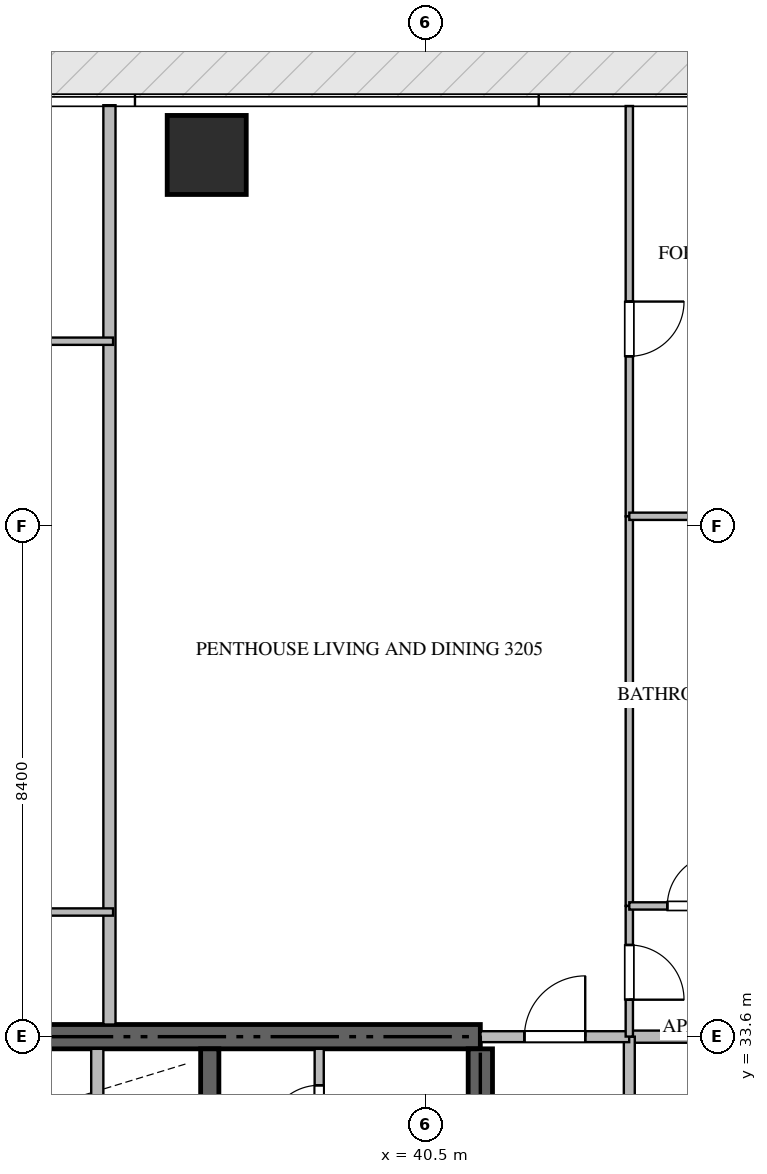
"""IFC4 building model, lengths in metres.
Left out: names, types, materials, properties, quantities, classifications, styles, units other than length and angle.
Written with IfcOpenShell. Run it as: python <this file> out.ifc"""

import sys

from ifc_helpers import new_model, si_unit, direction, frame, frame_2d, origin, origin_2d, place, context, subcontext, project, spatial, rectangle, extrude, source, transform, mapped, element, fill, save


model = new_model("IFC4")
c1 = context("Model", 3, precision=1e-05, world=origin(), true_north=direction((0.0, 1.0)))
c2 = subcontext(c1, "Body", "Model", "MODEL_VIEW")
j1 = project(units=[si_unit("LENGTHUNIT", "METRE"), si_unit("PLANEANGLEUNIT", "RADIAN")], contexts=[c1])
p1 = place(None, origin())
s1 = spatial("IfcSite", under=j1, at=p1, CompositionType="ELEMENT")
p2 = place(p1, origin())
s2 = spatial("IfcBuilding", under=s1, at=p2, CompositionType="ELEMENT")
p3 = place(p2, frame((0.0, 0.0, 131.4)))
s3 = spatial("IfcBuildingStorey", under=s2, at=p3, CompositionType="ELEMENT", Elevation=131.4)
p4 = place(p3, frame((41.4, 33.6, -0.26), z_axis=(0.0, 0.0, 1.0), x_axis=(-1.0, 0.0, 0.0)))
e1 = element("IfcWall", 1, at=p4, inside=s3, PredefinedType="SHEAR", context=c2, shape_type="SweptSolid", body=[
    extrude(rectangle(XDim=18.0, YDim=0.4, at=frame_2d((9.0, 0.0))), origin(), (0.0, 0.0, 1.0), 3.748),
])
p5 = place(p3, frame((41.4, 27.75, -0.26), z_axis=(0.0, 0.0, 1.0), x_axis=(0.0, 1.0, 0.0)))
e2 = element("IfcWall", 2, at=p5, inside=s3, PredefinedType="SHEAR", context=c2, shape_type="SweptSolid", body=[
    extrude(rectangle(XDim=5.65, YDim=0.4, at=frame_2d((2.825, 0.0))), origin(), (0.0, 0.0, 1.0), 3.748),
])
p6 = place(p3, frame((36.95, 27.05, -0.26), z_axis=(0.0, 0.0, 1.0), x_axis=(0.0, 1.0, 0.0)))
e3 = element("IfcWall", 3, at=p6, inside=s3, PredefinedType="SHEAR", context=c2, shape_type="SweptSolid", body=[
    extrude(rectangle(XDim=6.35, YDim=0.3, at=frame_2d((3.175, 0.0))), origin(), (0.0, 0.0, 1.0), 3.748),
])
m1 = source(origin(), c2, "Body", "SweptSolid", [
    extrude(rectangle(XDim=1.3, YDim=1.3, at=origin_2d()), origin(), (0.0, 0.0, 1.0), 3.75),
])
p7 = place(p3, frame((36.9, 48.1, -0.26), z_axis=(0.0, 0.0, 1.0), x_axis=(1.0, 0.0, 0.0)))
e4 = element("IfcColumn", 4, at=p7, inside=s3, PredefinedType="COLUMN", context=c2, shape_type="MappedRepresentation", body=[
    mapped(m1, transform((0.0, 0.0, 0.0), scale=1.0)),
])
p8 = place(p3, frame((35.1, 30.75, 0.0), z_axis=(0.0, 0.0, 1.0), x_axis=(0.0, 1.0, 0.0)))
e5 = element("IfcWall", 5, at=p8, inside=s3, PredefinedType="STANDARD", context=c2, shape_type="SweptSolid", body=[
    extrude(rectangle(XDim=2.65, YDim=0.2, at=frame_2d((1.325, 0.0))), origin(), (0.0, 0.0, 1.0), 3.49),
])
p9 = place(p3, frame((38.75, 31.352, 0.0), z_axis=(0.0, 0.0, 1.0), x_axis=(0.0, 1.0, 0.0)))
e6 = element("IfcWall", 6, at=p9, inside=s3, PredefinedType="PARTITIONING", context=c2, shape_type="SweptSolid", body=[
    extrude(rectangle(XDim=2.048, YDim=0.15, at=frame_2d((1.024, 0.0))), origin(), (0.0, 0.0, 1.0), 3.49),
])
p10 = place(p9, frame((0.599, 0.0, 0.0)))
e7 = element("IfcOpeningElement", 7, at=p10, cuts=e6, PredefinedType="OPENING", context=c2, shape_type="SweptSolid", body=[
    extrude(rectangle(XDim=0.85, YDim=2.1, at=frame_2d((0.425, 1.05))), frame((0.0, 0.085, 0.0), z_axis=(0.0, -1.0, 0.0), x_axis=(1.0, 0.0, 0.0)), (0.0, 0.0, 1.0), 0.17),
])
p11 = place(p3, frame((35.3, 33.8, 0.0), z_axis=(0.0, 0.0, 1.0), x_axis=(0.0, 1.0, 0.0)))
e8 = element("IfcWall", 8, at=p11, inside=s3, PredefinedType="PARTITIONING", context=c2, shape_type="SweptSolid", body=[
    extrude(rectangle(XDim=15.118, YDim=0.2, at=frame_2d((7.559, 0.0))), origin(), (0.0, 0.0, 1.0), 3.49),
])
p12 = place(p3, frame((43.85, 33.6, 0.0), z_axis=(0.0, 0.0, 1.0), x_axis=(1.0, 0.0, 0.0)))
e9 = element("IfcWall", 9, at=p12, inside=s3, PredefinedType="PARTITIONING", context=c2, shape_type="SweptSolid", body=[
    extrude(rectangle(XDim=13.068, YDim=0.2, at=frame_2d((6.534, 0.0))), origin(), (0.0, 0.0, 1.0), 3.49),
])
p13 = place(p3, frame((43.85, 14.9, 0.0), z_axis=(0.0, 0.0, 1.0), x_axis=(0.0, 1.0, 0.0)))
e10 = element("IfcWall", 10, at=p13, inside=s3, PredefinedType="PARTITIONING", context=c2, shape_type="SweptSolid", body=[
    extrude(rectangle(XDim=18.7, YDim=0.18, at=frame_2d((9.35, 0.0))), origin(), (0.0, 0.0, 1.0), 3.49),
])
p14 = place(p13, frame((6.708, 0.0, 0.0)))
e11 = element("IfcOpeningElement", 11, at=p14, cuts=e10, PredefinedType="OPENING", context=c2, shape_type="SweptSolid", body=[
    extrude(rectangle(XDim=1.0, YDim=2.15, at=frame_2d((0.5, 1.075))), frame((0.0, 0.1, 0.0), z_axis=(0.0, -1.0, 0.0), x_axis=(1.0, 0.0, 0.0)), (0.0, 0.0, 1.0), 0.2),
])
p15 = place(p13, frame((15.134, 0.0, 0.0)))
e12 = element("IfcOpeningElement", 12, at=p15, cuts=e10, PredefinedType="OPENING", context=c2, shape_type="SweptSolid", body=[
    extrude(rectangle(XDim=1.0, YDim=2.15, at=frame_2d((0.5, 1.075))), frame((0.0, 0.1, 0.0), z_axis=(0.0, -1.0, 0.0), x_axis=(1.0, 0.0, 0.0)), (0.0, 0.0, 1.0), 0.2),
])
p16 = place(p3, frame((41.402, 33.6, 0.0), z_axis=(0.0, 0.0, 1.0), x_axis=(1.0, 0.0, 0.0)))
e13 = element("IfcWall", 13, at=p16, inside=s3, PredefinedType="PARTITIONING", context=c2, shape_type="SweptSolid", body=[
    extrude(rectangle(XDim=2.446, YDim=0.18, at=frame_2d((1.223, 0.0))), origin(), (0.0, 0.0, 1.0), 3.49),
])
p17 = place(p16, frame((0.723, 0.0, 0.0)))
e14 = element("IfcOpeningElement", 14, at=p17, cuts=e13, PredefinedType="OPENING", context=c2, shape_type="SweptSolid", body=[
    extrude(rectangle(XDim=1.0, YDim=2.15, at=frame_2d((0.5, 1.075))), frame((0.0, 0.1, 0.0), z_axis=(0.0, -1.0, 0.0), x_axis=(1.0, 0.0, 0.0)), (0.0, 0.0, 1.0), 0.2),
])
for number, where, z_axis, x_axis in (
    (15, (26.3, 45.037, 0.0), (0.0, 0.0, 1.0), (1.0, 0.0, 0.0)),
    (16, (26.3, 35.65, 0.0), (0.0, 0.0, 1.0), (1.0, 0.0, 0.0)),
):
    element("IfcWall", number, at=place(p3, frame(where, z_axis=z_axis, x_axis=x_axis)), inside=s3, PredefinedType="PARTITIONING", context=c2, shape_type="SweptSolid", body=[
        extrude(rectangle(XDim=9.06, YDim=0.12, at=frame_2d((4.53, 0.0))), origin(), (0.0, 0.0, 1.0), 3.49),
    ])
p18 = place(p3, frame((43.85, 35.75, 0.0), z_axis=(0.0, 0.0, 1.0), x_axis=(0.0, -1.0, 0.0)))
e17 = element("IfcWall", 17, at=p18, inside=s3, PredefinedType="PARTITIONING", context=c2, shape_type="SweptSolid", body=[
    extrude(rectangle(XDim=2.148, YDim=0.12, at=frame_2d((1.074, 0.0))), origin(), (0.0, 0.0, 1.0), 3.49),
])
p19 = place(p18, frame((0.642, 0.0, 0.0)))
e18 = element("IfcOpeningElement", 18, at=p19, cuts=e17, PredefinedType="OPENING", context=c2, shape_type="SweptSolid", body=[
    extrude(rectangle(XDim=0.9, YDim=2.1, at=frame_2d((0.45, 1.05))), frame((0.0, 0.07, 0.0), z_axis=(0.0, -1.0, 0.0), x_axis=(1.0, 0.0, 0.0)), (0.0, 0.0, 1.0), 0.14),
])
p20 = place(p3, frame((43.85, 48.905, 0.0), z_axis=(0.0, 0.0, 1.0), x_axis=(0.0, -1.0, 0.0)))
e19 = element("IfcWall", 19, at=p20, inside=s3, PredefinedType="PARTITIONING", context=c2, shape_type="SweptSolid", body=[
    extrude(rectangle(XDim=6.747, YDim=0.12, at=frame_2d((3.374, 0.0))), origin(), (0.0, 0.0, 1.0), 3.49),
])
p21 = place(p20, frame((3.216, 0.0, 0.0)))
e20 = element("IfcOpeningElement", 20, at=p21, cuts=e19, PredefinedType="OPENING", context=c2, shape_type="SweptSolid", body=[
    extrude(rectangle(XDim=0.9, YDim=2.1, at=frame_2d((0.45, 1.05))), frame((0.0, 0.07, 0.0), z_axis=(0.0, -1.0, 0.0), x_axis=(1.0, 0.0, 0.0)), (0.0, 0.0, 1.0), 0.14),
])
p22 = place(p3, frame((43.85, 42.156, 0.0), z_axis=(0.0, 0.0, 1.0), x_axis=(0.0, -1.0, 0.0)))
e21 = element("IfcWall", 21, at=p22, inside=s3, PredefinedType="PARTITIONING", context=c2, shape_type="SweptSolid", body=[
    extrude(rectangle(XDim=6.404, YDim=0.12, at=frame_2d((3.202, 0.0))), origin(), (0.0, 0.0, 1.0), 3.49),
])
p23 = place(p3, frame((43.85, 42.158, 0.0), z_axis=(0.0, 0.0, 1.0), x_axis=(1.0, 0.0, 0.0)))
e22 = element("IfcWall", 22, at=p23, inside=s3, PredefinedType="PARTITIONING", context=c2, shape_type="SweptSolid", body=[
    extrude(rectangle(XDim=5.6, YDim=0.12, at=frame_2d((2.8, 0.0))), origin(), (0.0, 0.0, 1.0), 3.49),
])
p24 = place(p3, frame((43.85, 35.75, 0.0), z_axis=(0.0, 0.0, 1.0), x_axis=(1.0, 0.0, 0.0)))
e23 = element("IfcWall", 23, at=p24, inside=s3, PredefinedType="PARTITIONING", context=c2, shape_type="SweptSolid", body=[
    extrude(rectangle(XDim=2.1, YDim=0.12, at=frame_2d((1.05, 0.0))), origin(), (0.0, 0.0, 1.0), 3.49),
])
p25 = place(p24, frame((0.625, 0.0, 0.0)))
e24 = element("IfcOpeningElement", 24, at=p25, cuts=e23, PredefinedType="OPENING", context=c2, shape_type="SweptSolid", body=[
    extrude(rectangle(XDim=0.85, YDim=2.1, at=frame_2d((0.425, 1.05))), frame((0.0, 0.07, 0.0), z_axis=(0.0, -1.0, 0.0), x_axis=(1.0, 0.0, 0.0)), (0.0, 0.0, 1.0), 0.14),
])
m2 = source(origin(), c2, "Body", "SweptSolid", [
    extrude(rectangle(XDim=0.85, YDim=2.1, at=frame_2d((0.425, 1.05))), frame((0.0, 0.025, 0.0), z_axis=(0.0, -1.0, 0.0), x_axis=(1.0, 0.0, 0.0)), (0.0, 0.0, 1.0), 0.05),
])
p26 = place(p10, origin())
e25 = element("IfcDoor", 25, at=p26, inside=s3, OperationType="SINGLE_SWING_LEFT", PredefinedType="DOOR", context=c2, shape_type="MappedRepresentation", body=[
    mapped(m2, transform((0.0, 0.0, 0.0), scale=1.0)),
])
fill(e7, e25)
m3 = source(origin(), c2, "Body", "SweptSolid", [
    extrude(rectangle(XDim=1.0, YDim=2.15, at=frame_2d((0.5, 1.075))), frame((0.0, 0.025, 0.0), z_axis=(0.0, -1.0, 0.0), x_axis=(1.0, 0.0, 0.0)), (0.0, 0.0, 1.0), 0.05),
])
p27 = place(p17, origin())
e26 = element("IfcDoor", 26, at=p27, inside=s3, OperationType="SINGLE_SWING_RIGHT", PredefinedType="DOOR", context=c2, shape_type="MappedRepresentation", body=[
    mapped(m3, transform((0.0, 0.0, 0.0), scale=1.0)),
])
fill(e14, e26)
m4 = source(origin(), c2, "Body", "SweptSolid", [
    extrude(rectangle(XDim=0.9, YDim=2.1, at=frame_2d((0.45, 1.05))), frame((0.0, 0.025, 0.0), z_axis=(0.0, -1.0, 0.0), x_axis=(1.0, 0.0, 0.0)), (0.0, 0.0, 1.0), 0.05),
])
p28 = place(p19, origin())
e27 = element("IfcDoor", 27, at=p28, inside=s3, OperationType="SINGLE_SWING_RIGHT", PredefinedType="DOOR", context=c2, shape_type="MappedRepresentation", body=[
    mapped(m4, transform((0.0, 0.0, 0.0), scale=1.0)),
])
fill(e18, e27)
p29 = place(p21, origin())
e28 = element("IfcDoor", 28, at=p29, inside=s3, OperationType="SINGLE_SWING_LEFT", PredefinedType="DOOR", context=c2, shape_type="MappedRepresentation", body=[
    mapped(m4, transform((0.0, 0.0, 0.0), scale=1.0)),
])
fill(e20, e28)
p30 = place(p25, origin())
e29 = element("IfcDoor", 29, at=p30, inside=s3, OperationType="SINGLE_SWING_RIGHT", PredefinedType="DOOR", context=c2, shape_type="MappedRepresentation", body=[
    mapped(m2, transform((0.0, 0.0, 0.0), scale=1.0)),
])
fill(e24, e29)
save(model, sys.argv[1])
